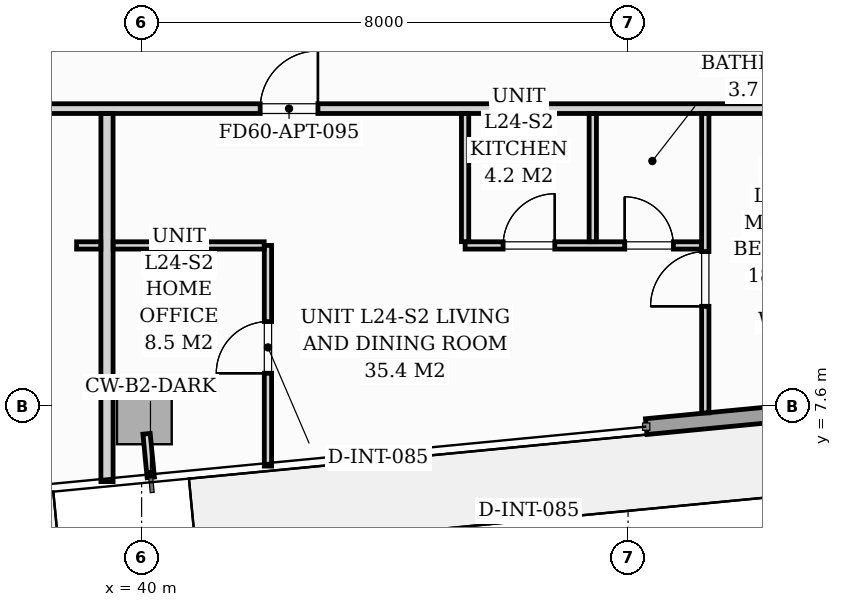
"""IFC4 building model, lengths in metres.
Left out: names, types, materials, properties, quantities, classifications, styles, units other than length and angle.
Written with IfcOpenShell. Run it as: python <this file> out.ifc"""

import sys

from ifc_helpers import new_model, si_unit, direction, frame, frame_2d, origin, origin_2d, place, context, subcontext, project, spatial, rectangle, extrude, source, transform, mapped, element, fill, save


model = new_model("IFC4")
c1 = context("Model", 3, precision=1e-05, world=origin(), true_north=direction((0.0, 1.0)))
c2 = subcontext(c1, "Body", "Model", "MODEL_VIEW")
j1 = project(units=[si_unit("LENGTHUNIT", "METRE"), si_unit("PLANEANGLEUNIT", "RADIAN")], contexts=[c1])
p1 = place(None, origin())
s1 = spatial("IfcSite", under=j1, at=p1, CompositionType="ELEMENT")
p2 = place(p1, origin())
s2 = spatial("IfcBuilding", under=s1, at=p2, CompositionType="ELEMENT")
p3 = place(p2, frame((0.0, 0.0, 87.4)))
s3 = spatial("IfcBuildingStorey", under=s2, at=p3, CompositionType="ELEMENT", Elevation=87.4)
m1 = source(origin(), c2, "Body", "SweptSolid", [
    extrude(rectangle(XDim=0.9, YDim=1.1, at=origin_2d()), origin(), (0.0, 0.0, 1.0), 3.196),
])
p4 = place(p3, frame((40.045, 7.521, 0.002), z_axis=(0.0, 0.0, 1.0), x_axis=(0.995396198367, 0.09584575252, 0.0)))
e1 = element("IfcColumn", 1, at=p4, inside=s3, PredefinedType="COLUMN", context=c2, shape_type="MappedRepresentation", body=[
    mapped(m1, transform((0.0, 0.0, 0.0), scale=1.0)),
])
p5 = place(p3, frame((67.32, 9.092, 0.0), z_axis=(0.0, 0.0, 1.0), x_axis=(-0.995396521236, -0.095842399342, 0.0)))
e2 = element("IfcWall", 2, at=p5, inside=s3, PredefinedType="STANDARD", context=c2, shape_type="SweptSolid", body=[
    extrude(rectangle(XDim=19.11, YDim=0.26, at=frame_2d((9.555, 0.0))), origin(), (0.0, 0.0, 1.0), 2.94),
])
p6 = place(p5, frame((9.651, 0.0, 0.0)))
e3 = element("IfcOpeningElement", 3, at=p6, cuts=e2, PredefinedType="OPENING", context=c2, shape_type="SweptSolid", body=[
    extrude(rectangle(XDim=1.8, YDim=2.06, at=frame_2d((0.9, 1.03))), frame((0.0, 0.14, 0.0), z_axis=(0.0, -1.0, 0.0), x_axis=(1.0, 0.0, 0.0)), (0.0, 0.0, 1.0), 0.28),
])
p7 = place(p5, frame((2.05, 0.0, 0.65)))
e4 = element("IfcOpeningElement", 4, at=p7, cuts=e2, PredefinedType="OPENING", context=c2, shape_type="SweptSolid", body=[
    extrude(rectangle(XDim=1.6, YDim=1.5, at=frame_2d((0.8, 0.75))), frame((0.0, 0.14, 0.0), z_axis=(0.0, -1.0, 0.0), x_axis=(1.0, 0.0, 0.0)), (0.0, 0.0, 1.0), 0.28),
])
p8 = place(p5, frame((15.198, 0.0, 0.75)))
e5 = element("IfcOpeningElement", 5, at=p8, cuts=e2, PredefinedType="OPENING", context=c2, shape_type="SweptSolid", body=[
    extrude(rectangle(XDim=1.6, YDim=1.5, at=frame_2d((0.8, 0.75))), frame((0.0, 0.14, 0.0), z_axis=(0.0, -1.0, 0.0), x_axis=(1.0, 0.0, 0.0)), (0.0, 0.0, 1.0), 0.28),
])
p9 = place(p3, frame((17.7, 12.49, 0.0), z_axis=(0.0, 0.0, 1.0), x_axis=(1.0, 0.0, 0.0)))
e6 = element("IfcWall", 6, at=p9, inside=s3, PredefinedType="PARTITIONING", context=c2, shape_type="SweptSolid", body=[
    extrude(rectangle(XDim=35.4, YDim=0.16, at=frame_2d((17.7, 0.0))), origin(), (0.0, 0.0, 1.0), 2.94),
])
p10 = place(p9, frame((11.19, 0.0, 0.0)))
e7 = element("IfcOpeningElement", 7, at=p10, cuts=e6, PredefinedType="OPENING", context=c2, shape_type="SweptSolid", body=[
    extrude(rectangle(XDim=0.95, YDim=2.06, at=frame_2d((0.475, 1.03))), frame((0.0, 0.09, 0.0), z_axis=(0.0, -1.0, 0.0), x_axis=(1.0, 0.0, 0.0)), (0.0, 0.0, 1.0), 0.18),
])
p11 = place(p9, frame((24.25, 0.0, 0.0)))
e8 = element("IfcOpeningElement", 8, at=p11, cuts=e6, PredefinedType="OPENING", context=c2, shape_type="SweptSolid", body=[
    extrude(rectangle(XDim=0.95, YDim=2.06, at=frame_2d((0.475, 1.03))), frame((0.0, 0.09, 0.0), z_axis=(0.0, -1.0, 0.0), x_axis=(1.0, 0.0, 0.0)), (0.0, 0.0, 1.0), 0.18),
])
p12 = place(p3, frame((39.431, 6.356, 0.0), z_axis=(0.0, 0.0, 1.0), x_axis=(0.0, 1.0, 0.0)))
e9 = element("IfcWall", 9, at=p12, inside=s3, PredefinedType="PARTITIONING", context=c2, shape_type="SweptSolid", body=[
    extrude(rectangle(XDim=6.052, YDim=0.2, at=frame_2d((3.026, 0.0))), origin(), (0.0, 0.0, 1.0), 2.94),
])
p13 = place(p3, frame((49.27, 7.487, 0.0), z_axis=(0.0, 0.0, 1.0), x_axis=(0.0, 1.0, 0.0)))
e10 = element("IfcWall", 10, at=p13, inside=s3, PredefinedType="PARTITIONING", context=c2, shape_type="SweptSolid", body=[
    extrude(rectangle(XDim=4.921, YDim=0.12, at=frame_2d((2.461, 0.0))), origin(), (0.0, 0.0, 1.0), 2.94),
])
p14 = place(p13, frame((1.752, 0.0, 0.0)))
e11 = element("IfcOpeningElement", 11, at=p14, cuts=e10, PredefinedType="OPENING", context=c2, shape_type="SweptSolid", body=[
    extrude(rectangle(XDim=0.9, YDim=2.05, at=frame_2d((0.45, 1.025))), frame((0.0, 0.07, 0.0), z_axis=(0.0, -1.0, 0.0), x_axis=(1.0, 0.0, 0.0)), (0.0, 0.0, 1.0), 0.14),
])
p15 = place(p3, frame((45.32, 10.24, 0.0), z_axis=(0.0, 0.0, 1.0), x_axis=(1.0, 0.0, 0.0)))
e12 = element("IfcWall", 12, at=p15, inside=s3, PredefinedType="PARTITIONING", context=c2, shape_type="SweptSolid", body=[
    extrude(rectangle(XDim=3.888, YDim=0.12, at=frame_2d((1.944, 0.0))), origin(), (0.0, 0.0, 1.0), 2.94),
])
p16 = place(p15, frame((0.625, 0.0, 0.0)))
e13 = element("IfcOpeningElement", 13, at=p16, cuts=e12, PredefinedType="OPENING", context=c2, shape_type="SweptSolid", body=[
    extrude(rectangle(XDim=0.85, YDim=2.05, at=frame_2d((0.425, 1.025))), frame((0.0, 0.07, 0.0), z_axis=(0.0, -1.0, 0.0), x_axis=(1.0, 0.0, 0.0)), (0.0, 0.0, 1.0), 0.14),
])
p17 = place(p15, frame((2.625, 0.0, 0.0)))
e14 = element("IfcOpeningElement", 14, at=p17, cuts=e12, PredefinedType="OPENING", context=c2, shape_type="SweptSolid", body=[
    extrude(rectangle(XDim=0.8, YDim=2.02, at=frame_2d((0.4, 1.01))), frame((0.0, 0.07, 0.0), z_axis=(0.0, -1.0, 0.0), x_axis=(1.0, 0.0, 0.0)), (0.0, 0.0, 1.0), 0.14),
])
for number, where, z_axis, x_axis in (
    (15, (47.42, 10.302, 0.0), (0.0, 0.0, 1.0), (0.0, 1.0, 0.0)),
    (16, (45.32, 10.302, 0.0), (0.0, 0.0, 1.0), (0.0, 1.0, 0.0)),
):
    element("IfcWall", number, at=place(p3, frame(where, z_axis=z_axis, x_axis=x_axis)), inside=s3, PredefinedType="PARTITIONING", context=c2, shape_type="SweptSolid", body=[
        extrude(rectangle(XDim=2.106, YDim=0.12, at=frame_2d((1.053, 0.0))), origin(), (0.0, 0.0, 1.0), 2.94),
    ])
p18 = place(p3, frame((42.078, 6.611, 0.0), z_axis=(0.0, 0.0, 1.0), x_axis=(0.0, 1.0, 0.0)))
e17 = element("IfcWall", 17, at=p18, inside=s3, PredefinedType="PARTITIONING", context=c2, shape_type="SweptSolid", body=[
    extrude(rectangle(XDim=3.629, YDim=0.12, at=frame_2d((1.814, 0.0))), origin(), (0.0, 0.0, 1.0), 2.94),
])
p19 = place(p18, frame((1.527, 0.0, 0.0)))
e18 = element("IfcOpeningElement", 18, at=p19, cuts=e17, PredefinedType="OPENING", context=c2, shape_type="SweptSolid", body=[
    extrude(rectangle(XDim=0.85, YDim=2.05, at=frame_2d((0.425, 1.025))), frame((0.0, 0.07, 0.0), z_axis=(0.0, -1.0, 0.0), x_axis=(1.0, 0.0, 0.0)), (0.0, 0.0, 1.0), 0.14),
])
p20 = place(p3, frame((38.931, 10.24, 0.0), z_axis=(0.0, 0.0, 1.0), x_axis=(1.0, 0.0, 0.0)))
e19 = element("IfcWall", 19, at=p20, inside=s3, PredefinedType="PARTITIONING", context=c2, shape_type="SweptSolid", body=[
    extrude(rectangle(XDim=0.398, YDim=0.12, at=frame_2d((0.199, 0.0))), origin(), (0.0, 0.0, 1.0), 2.94),
])
p21 = place(p3, frame((39.533, 10.24, 0.0), z_axis=(0.0, 0.0, 1.0), x_axis=(1.0, 0.0, 0.0)))
e20 = element("IfcWall", 20, at=p21, inside=s3, PredefinedType="PARTITIONING", context=c2, shape_type="SweptSolid", body=[
    extrude(rectangle(XDim=2.483, YDim=0.12, at=frame_2d((1.242, 0.0))), origin(), (0.0, 0.0, 1.0), 2.94),
])
p22 = place(p3, frame((40.082, 7.142, 0.0), z_axis=(0.0, 0.0, 1.0), x_axis=(0.095944965663, -0.995386640238, 0.0)))
e21 = element("IfcWall", 21, at=p22, inside=s3, PredefinedType="PARTITIONING", context=c2, shape_type="SweptSolid", body=[
    extrude(rectangle(XDim=0.72, YDim=0.12, at=frame_2d((0.36, 0.0))), origin(), (0.0, 0.0, 1.0), 2.94),
])
m2 = source(origin(), c2, "Body", "SweptSolid", [
    extrude(rectangle(XDim=0.85, YDim=2.05, at=frame_2d((0.425, 1.025))), frame((0.0, 0.025, 0.0), z_axis=(0.0, -1.0, 0.0), x_axis=(1.0, 0.0, 0.0)), (0.0, 0.0, 1.0), 0.05),
])
p23 = place(p19, origin())
e22 = element("IfcDoor", 22, at=p23, inside=s3, OperationType="SINGLE_SWING_LEFT", PredefinedType="DOOR", context=c2, shape_type="MappedRepresentation", body=[
    mapped(m2, transform((0.0, 0.0, 0.0), scale=1.0)),
])
fill(e18, e22)
m3 = source(origin(), c2, "Body", "SweptSolid", [
    extrude(rectangle(XDim=0.95, YDim=2.06, at=frame_2d((0.475, 1.03))), frame((0.0, 0.025, 0.0), z_axis=(0.0, -1.0, 0.0), x_axis=(1.0, 0.0, 0.0)), (0.0, 0.0, 1.0), 0.05),
])
p24 = place(p11, origin())
e23 = element("IfcDoor", 23, at=p24, inside=s3, OperationType="SINGLE_SWING_RIGHT", PredefinedType="DOOR", context=c2, shape_type="MappedRepresentation", body=[
    mapped(m3, transform((0.0, 0.0, 0.0), scale=1.0)),
])
fill(e8, e23)
m4 = source(origin(), c2, "Body", "SweptSolid", [
    extrude(rectangle(XDim=0.9, YDim=2.05, at=frame_2d((0.45, 1.025))), frame((0.0, 0.025, 0.0), z_axis=(0.0, -1.0, 0.0), x_axis=(1.0, 0.0, 0.0)), (0.0, 0.0, 1.0), 0.05),
])
p25 = place(p14, origin())
e24 = element("IfcDoor", 24, at=p25, inside=s3, OperationType="SINGLE_SWING_LEFT", PredefinedType="DOOR", context=c2, shape_type="MappedRepresentation", body=[
    mapped(m4, transform((0.0, 0.0, 0.0), scale=1.0)),
])
fill(e11, e24)
p26 = place(p16, origin())
e25 = element("IfcDoor", 25, at=p26, inside=s3, OperationType="SINGLE_SWING_RIGHT", PredefinedType="DOOR", context=c2, shape_type="MappedRepresentation", body=[
    mapped(m2, transform((0.0, 0.0, 0.0), scale=1.0)),
])
fill(e13, e25)
m5 = source(origin(), c2, "Body", "SweptSolid", [
    extrude(rectangle(XDim=0.8, YDim=2.02, at=frame_2d((0.4, 1.01))), frame((0.0, 0.025, 0.0), z_axis=(0.0, -1.0, 0.0), x_axis=(1.0, 0.0, 0.0)), (0.0, 0.0, 1.0), 0.05),
])
p27 = place(p17, origin())
e26 = element("IfcDoor", 26, at=p27, inside=s3, OperationType="SINGLE_SWING_LEFT", PredefinedType="DOOR", context=c2, shape_type="MappedRepresentation", body=[
    mapped(m5, transform((0.0, 0.0, 0.0), scale=1.0)),
])
fill(e14, e26)
save(model, sys.argv[1])
